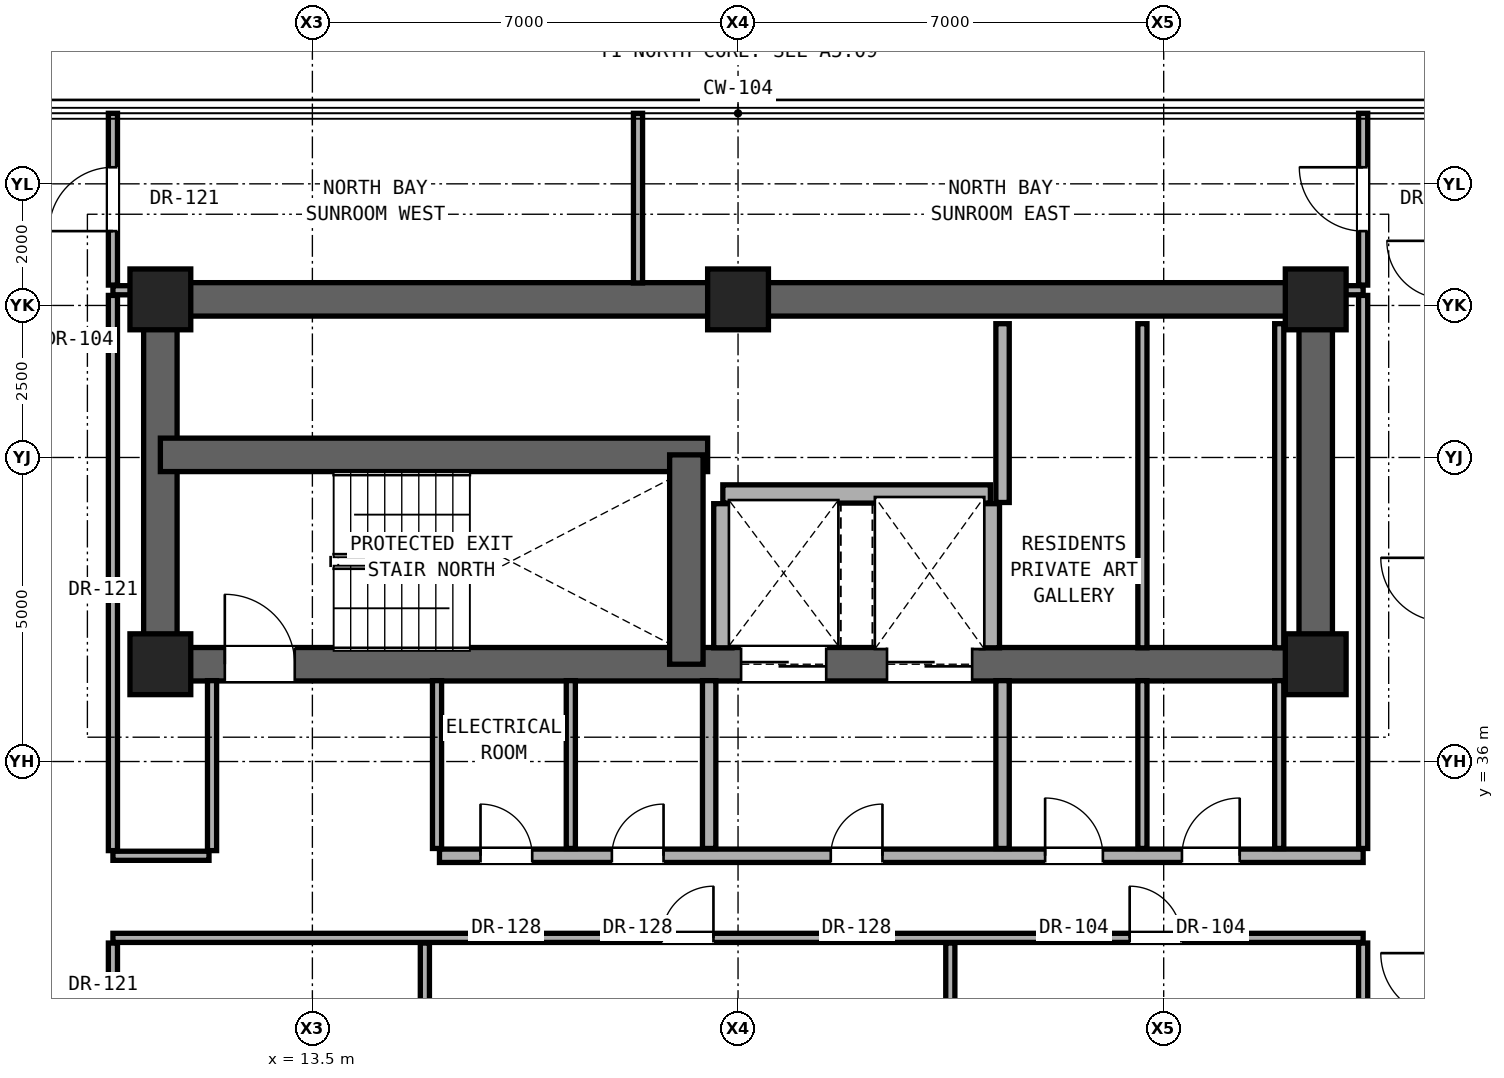
"""IFC4 building model, lengths in metres.
Left out: names, types, materials, properties, quantities, classifications, styles, units other than length and angle.
Written with IfcOpenShell. Run it as: python <this file> out.ifc"""

import sys

from ifc_helpers import new_model, si_unit, direction, frame, frame_2d, origin, origin_2d, place, context, subcontext, project, spatial, rectangle, extrude, element, fill, save


model = new_model("IFC4")
c1 = context("Model", 3, precision=1e-05, world=origin(), true_north=direction((0.0, 1.0)))
c2 = subcontext(c1, "Body", "Model", "MODEL_VIEW")
j1 = project(units=[si_unit("LENGTHUNIT", "METRE"), si_unit("PLANEANGLEUNIT", "RADIAN")], contexts=[c1])
p1 = place(None, origin())
s1 = spatial("IfcSite", under=j1, at=p1, CompositionType="ELEMENT")
p2 = place(p1, origin())
s2 = spatial("IfcBuilding", under=s1, at=p2, CompositionType="ELEMENT")
p3 = place(p2, frame((0.0, 0.0, 170.65)))
s3 = spatial("IfcBuildingStorey", under=s2, at=p3, CompositionType="ELEMENT", Elevation=170.65)
for number, where, z_axis, x_axis in (
    (1, (11.0, 37.6, 0.0), (0.0, 0.0, 1.0), (1.0, 0.0, 0.0)),
    (2, (30.0, 37.6, 0.0), (0.0, 0.0, 1.0), (1.0, 0.0, 0.0)),
    (3, (11.0, 43.6, 0.0), (0.0, 0.0, 1.0), (1.0, 0.0, 0.0)),
    (4, (20.5, 43.6, 0.0), (0.0, 0.0, 1.0), (1.0, 0.0, 0.0)),
    (5, (30.0, 43.6, 0.0), (0.0, 0.0, 1.0), (1.0, 0.0, 0.0)),
):
    element("IfcColumn", number, at=place(p3, frame(where, z_axis=z_axis, x_axis=x_axis)), inside=s3, PredefinedType="COLUMN", context=c2, shape_type="SweptSolid", body=[
        extrude(rectangle(XDim=1.0, YDim=1.0, at=origin_2d()), origin(), (0.0, 0.0, 1.0), 3.25),
    ])
p4 = place(p3, frame((11.0, 43.6, 0.0), z_axis=(0.0, 0.0, 1.0), x_axis=(1.0, 0.0, 0.0)))
e6 = element("IfcWall", 6, at=p4, inside=s3, PredefinedType="SHEAR", context=c2, shape_type="SweptSolid", body=[
    extrude(rectangle(XDim=19.0, YDim=0.55, at=frame_2d((9.5, 0.0))), origin(), (0.0, 0.0, 1.0), 3.05),
])
for number, where, z_axis, x_axis in (
    (7, (11.0, 37.6, 0.0), (0.0, 0.0, 1.0), (0.0, 1.0, 0.0)),
    (8, (30.0, 37.6, 0.0), (0.0, 0.0, 1.0), (0.0, 1.0, 0.0)),
):
    element("IfcWall", number, at=place(p3, frame(where, z_axis=z_axis, x_axis=x_axis)), inside=s3, PredefinedType="SHEAR", context=c2, shape_type="SweptSolid", body=[
        extrude(rectangle(XDim=6.0, YDim=0.55, at=frame_2d((3.0, 0.0))), origin(), (0.0, 0.0, 1.0), 3.05),
    ])
p5 = place(p3, frame((11.0, 37.6, 0.0), z_axis=(0.0, 0.0, 1.0), x_axis=(1.0, 0.0, 0.0)))
e9 = element("IfcWall", 9, at=p5, inside=s3, PredefinedType="SHEAR", context=c2, shape_type="SweptSolid", body=[
    extrude(rectangle(XDim=19.0, YDim=0.55, at=frame_2d((9.5, 0.0))), origin(), (0.0, 0.0, 1.0), 3.05),
])
p6 = place(p5, frame((1.06, 0.0, 0.0)))
e10 = element("IfcOpeningElement", 10, at=p6, cuts=e9, PredefinedType="OPENING", context=c2, shape_type="SweptSolid", body=[
    extrude(rectangle(XDim=1.15, YDim=2.2, at=frame_2d((0.575, 1.1))), frame((0.0, 0.285, 0.0), z_axis=(0.0, -1.0, 0.0), x_axis=(1.0, 0.0, 0.0)), (0.0, 0.0, 1.0), 0.57),
])
p7 = place(p5, frame((9.55, 0.0, 0.0)))
e11 = element("IfcOpeningElement", 11, at=p7, cuts=e9, PredefinedType="OPENING", context=c2, shape_type="SweptSolid", body=[
    extrude(rectangle(XDim=1.4, YDim=2.35, at=frame_2d((0.7, 1.175))), frame((0.0, 0.285, 0.0), z_axis=(0.0, -1.0, 0.0), x_axis=(1.0, 0.0, 0.0)), (0.0, 0.0, 1.0), 0.57),
])
p8 = place(p5, frame((11.95, 0.0, 0.0)))
e12 = element("IfcOpeningElement", 12, at=p8, cuts=e9, PredefinedType="OPENING", context=c2, shape_type="SweptSolid", body=[
    extrude(rectangle(XDim=1.4, YDim=2.35, at=frame_2d((0.7, 1.175))), frame((0.0, 0.285, 0.0), z_axis=(0.0, -1.0, 0.0), x_axis=(1.0, 0.0, 0.0)), (0.0, 0.0, 1.0), 0.57),
])
p9 = place(p3, frame((11.0, 41.043, 0.0), z_axis=(0.0, 0.0, 1.0), x_axis=(1.0, 0.0, 0.0)))
e13 = element("IfcWall", 13, at=p9, inside=s3, PredefinedType="SHEAR", context=c2, shape_type="SweptSolid", body=[
    extrude(rectangle(XDim=9.0, YDim=0.55, at=frame_2d((4.5, 0.0))), origin(), (0.0, 0.0, 1.0), 3.05),
])
p10 = place(p3, frame((19.65, 37.6, 0.0), z_axis=(0.0, 0.0, 1.0), x_axis=(0.0, 1.0, 0.0)))
e14 = element("IfcWall", 14, at=p10, inside=s3, PredefinedType="SHEAR", context=c2, shape_type="SweptSolid", body=[
    extrude(rectangle(XDim=3.443, YDim=0.55, at=frame_2d((1.721, 0.0))), origin(), (0.0, 0.0, 1.0), 3.05),
])
p11 = place(p3, frame((10.22, 33.1, 0.0), z_axis=(0.0, 0.0, 1.0), x_axis=(1.0, 0.0, 0.0)))
e15 = element("IfcWall", 15, at=p11, inside=s3, PredefinedType="PARTITIONING", context=c2, shape_type="SweptSolid", body=[
    extrude(rectangle(XDim=20.56, YDim=0.15, at=frame_2d((10.28, 0.0))), origin(), (0.0, 0.0, 1.0), 2.186),
])
p12 = place(p11, frame((9.025, 0.0, 0.0)))
e16 = element("IfcOpeningElement", 16, at=p12, cuts=e15, PredefinedType="OPENING", context=c2, shape_type="SweptSolid", body=[
    extrude(rectangle(XDim=0.85, YDim=2.01, at=frame_2d((0.425, 1.005))), frame((0.0, 0.085, 0.0), z_axis=(0.0, -1.0, 0.0), x_axis=(1.0, 0.0, 0.0)), (0.0, 0.0, 1.0), 0.17),
])
p13 = place(p11, frame((16.72, 0.0, 0.0)))
e17 = element("IfcOpeningElement", 17, at=p13, cuts=e15, PredefinedType="OPENING", context=c2, shape_type="SweptSolid", body=[
    extrude(rectangle(XDim=0.85, YDim=2.01, at=frame_2d((0.425, 1.005))), frame((0.0, 0.085, 0.0), z_axis=(0.0, -1.0, 0.0), x_axis=(1.0, 0.0, 0.0)), (0.0, 0.0, 1.0), 0.17),
])
p14 = place(p3, frame((10.22, 34.45, 0.0), z_axis=(0.0, 0.0, 1.0), x_axis=(1.0, 0.0, 0.0)))
e18 = element("IfcWall", 18, at=p14, inside=s3, PredefinedType="PARTITIONING", context=c2, shape_type="SweptSolid", body=[
    extrude(rectangle(XDim=1.58, YDim=0.15, at=frame_2d((0.79, 0.0))), origin(), (0.0, 0.0, 1.0), 2.186),
])
p15 = place(p3, frame((15.59, 34.45, 0.0), z_axis=(0.0, 0.0, 1.0), x_axis=(1.0, 0.0, 0.0)))
e19 = element("IfcWall", 19, at=p15, inside=s3, PredefinedType="SOLIDWALL", context=c2, shape_type="SweptSolid", body=[
    extrude(rectangle(XDim=15.19, YDim=0.22, at=frame_2d((7.595, 0.0))), origin(), (0.0, 0.0, 1.0), 2.186),
])
p16 = place(p15, frame((6.435, 0.0, 0.0)))
e20 = element("IfcOpeningElement", 20, at=p16, cuts=e19, PredefinedType="OPENING", context=c2, shape_type="SweptSolid", body=[
    extrude(rectangle(XDim=0.85, YDim=2.01, at=frame_2d((0.425, 1.005))), frame((0.0, 0.12, 0.0), z_axis=(0.0, -1.0, 0.0), x_axis=(1.0, 0.0, 0.0)), (0.0, 0.0, 1.0), 0.24),
])
p17 = place(p15, frame((9.96, 0.0, 0.0)))
e21 = element("IfcOpeningElement", 21, at=p17, cuts=e19, PredefinedType="OPENING", context=c2, shape_type="SweptSolid", body=[
    extrude(rectangle(XDim=0.95, YDim=2.15, at=frame_2d((0.475, 1.075))), frame((0.0, 0.12, 0.0), z_axis=(0.0, -1.0, 0.0), x_axis=(1.0, 0.0, 0.0)), (0.0, 0.0, 1.0), 0.24),
])
p18 = place(p15, frame((12.21, 0.0, 0.0)))
e22 = element("IfcOpeningElement", 22, at=p18, cuts=e19, PredefinedType="OPENING", context=c2, shape_type="SweptSolid", body=[
    extrude(rectangle(XDim=0.95, YDim=2.15, at=frame_2d((0.475, 1.075))), frame((0.0, 0.12, 0.0), z_axis=(0.0, -1.0, 0.0), x_axis=(1.0, 0.0, 0.0)), (0.0, 0.0, 1.0), 0.24),
])
p19 = place(p15, frame((0.675, 0.0, 0.0)))
e23 = element("IfcOpeningElement", 23, at=p19, cuts=e19, PredefinedType="OPENING", context=c2, shape_type="SweptSolid", body=[
    extrude(rectangle(XDim=0.85, YDim=2.01, at=frame_2d((0.425, 1.005))), frame((0.0, 0.12, 0.0), z_axis=(0.0, -1.0, 0.0), x_axis=(1.0, 0.0, 0.0)), (0.0, 0.0, 1.0), 0.24),
])
p20 = place(p15, frame((2.835, 0.0, 0.0)))
e24 = element("IfcOpeningElement", 24, at=p20, cuts=e19, PredefinedType="OPENING", context=c2, shape_type="SweptSolid", body=[
    extrude(rectangle(XDim=0.85, YDim=2.01, at=frame_2d((0.425, 1.005))), frame((0.0, 0.12, 0.0), z_axis=(0.0, -1.0, 0.0), x_axis=(1.0, 0.0, 0.0)), (0.0, 0.0, 1.0), 0.24),
])
p21 = place(p3, frame((20.25, 40.4, 0.0), z_axis=(0.0, 0.0, 1.0), x_axis=(1.0, 0.0, 0.0)))
e25 = element("IfcWall", 25, at=p21, inside=s3, PredefinedType="SOLIDWALL", context=c2, shape_type="SweptSolid", body=[
    extrude(rectangle(XDim=4.4, YDim=0.3, at=frame_2d((2.2, 0.0))), origin(), (0.0, 0.0, 1.0), 3.05),
])
for number, where, z_axis, x_axis in (
    (26, (10.22, 43.75, 0.0), (0.0, 0.0, 1.0), (1.0, 0.0, 0.0)),
    (27, (30.27, 43.75, 0.0), (0.0, 0.0, 1.0), (1.0, 0.0, 0.0)),
):
    element("IfcWall", number, at=place(p3, frame(where, z_axis=z_axis, x_axis=x_axis)), inside=s3, PredefinedType="PARTITIONING", context=c2, shape_type="SweptSolid", body=[
        extrude(rectangle(XDim=0.51, YDim=0.15, at=frame_2d((0.255, 0.0))), origin(), (0.0, 0.0, 1.0), 3.05),
    ])
p22 = place(p3, frame((10.22, 22.935, 0.0), z_axis=(0.0, 0.0, 1.0), x_axis=(0.0, 1.0, 0.0)))
e28 = element("IfcWall", 28, at=p22, inside=s3, PredefinedType="PARTITIONING", context=c2, shape_type="SweptSolid", body=[
    extrude(rectangle(XDim=10.08, YDim=0.15, at=frame_2d((5.04, 0.0))), origin(), (0.0, 0.0, 1.0), 2.346),
])
p23 = place(p22, frame((4.565, 0.0, 0.0)))
e29 = element("IfcOpeningElement", 29, at=p23, cuts=e28, PredefinedType="OPENING", context=c2, shape_type="SweptSolid", body=[
    extrude(rectangle(XDim=0.95, YDim=2.15, at=frame_2d((0.475, 1.075))), frame((0.0, 0.085, 0.0), z_axis=(0.0, -1.0, 0.0), x_axis=(1.0, 0.0, 0.0)), (0.0, 0.0, 1.0), 0.17),
])
p24 = place(p3, frame((10.22, 34.535, 0.0), z_axis=(0.0, 0.0, 1.0), x_axis=(0.0, 1.0, 0.0)))
e30 = element("IfcWall", 30, at=p24, inside=s3, PredefinedType="PARTITIONING", context=c2, shape_type="SweptSolid", body=[
    extrude(rectangle(XDim=9.13, YDim=0.15, at=frame_2d((4.565, 0.0))), origin(), (0.0, 0.0, 1.0), 2.442),
])
p25 = place(p3, frame((10.22, 43.835, 0.0), z_axis=(0.0, 0.0, 1.0), x_axis=(0.0, 1.0, 0.0)))
e31 = element("IfcWall", 31, at=p25, inside=s3, PredefinedType="PARTITIONING", context=c2, shape_type="SweptSolid", body=[
    extrude(rectangle(XDim=2.825, YDim=0.15, at=frame_2d((1.413, 0.0))), origin(), (0.0, 0.0, 1.0), 3.05),
])
p26 = place(p25, frame((0.887, 0.0, 0.0)))
e32 = element("IfcOpeningElement", 32, at=p26, cuts=e31, PredefinedType="OPENING", context=c2, shape_type="SweptSolid", body=[
    extrude(rectangle(XDim=1.05, YDim=2.2, at=frame_2d((0.525, 1.1))), frame((0.0, 0.085, 0.0), z_axis=(0.0, -1.0, 0.0), x_axis=(1.0, 0.0, 0.0)), (0.0, 0.0, 1.0), 0.17),
])
p27 = place(p3, frame((11.85, 34.535, 0.0), z_axis=(0.0, 0.0, 1.0), x_axis=(0.0, 1.0, 0.0)))
e33 = element("IfcWall", 33, at=p27, inside=s3, PredefinedType="PARTITIONING", context=c2, shape_type="SweptSolid", body=[
    extrude(rectangle(XDim=2.795, YDim=0.15, at=frame_2d((1.397, 0.0))), origin(), (0.0, 0.0, 1.0), 3.05),
])
p28 = place(p3, frame((15.35, 25.925, 0.0), z_axis=(0.0, 0.0, 1.0), x_axis=(0.0, 1.0, 0.0)))
e34 = element("IfcWall", 34, at=p28, inside=s3, PredefinedType="PARTITIONING", context=c2, shape_type="SweptSolid", body=[
    extrude(rectangle(XDim=7.09, YDim=0.15, at=frame_2d((3.545, 0.0))), origin(), (0.0, 0.0, 1.0), 2.186),
])
for number, where, z_axis, x_axis in (
    (35, (15.55, 34.57, 0.0), (0.0, 0.0, 1.0), (0.0, 1.0, 0.0)),
    (36, (17.75, 34.57, 0.0), (0.0, 0.0, 1.0), (0.0, 1.0, 0.0)),
):
    element("IfcWall", number, at=place(p3, frame(where, z_axis=z_axis, x_axis=x_axis)), inside=s3, PredefinedType="PARTITIONING", context=c2, shape_type="SweptSolid", body=[
        extrude(rectangle(XDim=2.76, YDim=0.15, at=frame_2d((1.38, 0.0))), origin(), (0.0, 0.0, 1.0), 3.05),
    ])
p29 = place(p3, frame((18.855, 43.87, 0.0), z_axis=(0.0, 0.0, 1.0), x_axis=(0.0, 1.0, 0.0)))
e37 = element("IfcWall", 37, at=p29, inside=s3, PredefinedType="PARTITIONING", context=c2, shape_type="SweptSolid", body=[
    extrude(rectangle(XDim=2.79, YDim=0.15, at=frame_2d((1.395, 0.0))), origin(), (0.0, 0.0, 1.0), 3.05),
])
p30 = place(p3, frame((20.025, 34.57, 0.0), z_axis=(0.0, 0.0, 1.0), x_axis=(0.0, 1.0, 0.0)))
e38 = element("IfcWall", 38, at=p30, inside=s3, PredefinedType="SOLIDWALL", context=c2, shape_type="SweptSolid", body=[
    extrude(rectangle(XDim=2.76, YDim=0.22, at=frame_2d((1.38, 0.0))), origin(), (0.0, 0.0, 1.0), 3.05),
])
p31 = place(p3, frame((20.25, 37.87, 0.0), z_axis=(0.0, 0.0, 1.0), x_axis=(0.0, 1.0, 0.0)))
e39 = element("IfcWall", 39, at=p31, inside=s3, PredefinedType="SOLIDWALL", context=c2, shape_type="SweptSolid", body=[
    extrude(rectangle(XDim=2.37, YDim=0.3, at=frame_2d((1.185, 0.0))), origin(), (0.0, 0.0, 1.0), 3.05),
])
p32 = place(p3, frame((23.991, 25.925, 0.0), z_axis=(0.0, 0.0, 1.0), x_axis=(0.0, 1.0, 0.0)))
e40 = element("IfcWall", 40, at=p32, inside=s3, PredefinedType="PARTITIONING", context=c2, shape_type="SweptSolid", body=[
    extrude(rectangle(XDim=7.09, YDim=0.15, at=frame_2d((3.545, 0.0))), origin(), (0.0, 0.0, 1.0), 2.186),
])
p33 = place(p3, frame((24.65, 37.87, 0.0), z_axis=(0.0, 0.0, 1.0), x_axis=(0.0, 1.0, 0.0)))
e41 = element("IfcWall", 41, at=p33, inside=s3, PredefinedType="SOLIDWALL", context=c2, shape_type="SweptSolid", body=[
    extrude(rectangle(XDim=2.37, YDim=0.3, at=frame_2d((1.185, 0.0))), origin(), (0.0, 0.0, 1.0), 3.05),
])
p34 = place(p3, frame((24.85, 34.57, 0.0), z_axis=(0.0, 0.0, 1.0), x_axis=(0.0, 1.0, 0.0)))
e42 = element("IfcWall", 42, at=p34, inside=s3, PredefinedType="SOLIDWALL", context=c2, shape_type="SweptSolid", body=[
    extrude(rectangle(XDim=2.76, YDim=0.22, at=frame_2d((1.38, 0.0))), origin(), (0.0, 0.0, 1.0), 3.05),
])
p35 = place(p3, frame((24.85, 40.26, 0.0), z_axis=(0.0, 0.0, 1.0), x_axis=(0.0, 1.0, 0.0)))
e43 = element("IfcWall", 43, at=p35, inside=s3, PredefinedType="SOLIDWALL", context=c2, shape_type="SweptSolid", body=[
    extrude(rectangle(XDim=2.94, YDim=0.22, at=frame_2d((1.47, 0.0))), origin(), (0.0, 0.0, 1.0), 3.05),
])
p36 = place(p3, frame((27.15, 34.57, 0.0), z_axis=(0.0, 0.0, 1.0), x_axis=(0.0, 1.0, 0.0)))
e44 = element("IfcWall", 44, at=p36, inside=s3, PredefinedType="PARTITIONING", context=c2, shape_type="SweptSolid", body=[
    extrude(rectangle(XDim=2.76, YDim=0.15, at=frame_2d((1.38, 0.0))), origin(), (0.0, 0.0, 1.0), 3.05),
])
p37 = place(p3, frame((27.15, 37.87, 0.0), z_axis=(0.0, 0.0, 1.0), x_axis=(0.0, 1.0, 0.0)))
e45 = element("IfcWall", 45, at=p37, inside=s3, PredefinedType="PARTITIONING", context=c2, shape_type="SweptSolid", body=[
    extrude(rectangle(XDim=5.33, YDim=0.15, at=frame_2d((2.665, 0.0))), origin(), (0.0, 0.0, 1.0), 3.05),
])
p38 = place(p3, frame((29.4, 34.57, 0.0), z_axis=(0.0, 0.0, 1.0), x_axis=(0.0, 1.0, 0.0)))
e46 = element("IfcWall", 46, at=p38, inside=s3, PredefinedType="PARTITIONING", context=c2, shape_type="SweptSolid", body=[
    extrude(rectangle(XDim=2.76, YDim=0.15, at=frame_2d((1.38, 0.0))), origin(), (0.0, 0.0, 1.0), 3.05),
])
p39 = place(p3, frame((29.4, 37.87, 0.0), z_axis=(0.0, 0.0, 1.0), x_axis=(0.0, 1.0, 0.0)))
e47 = element("IfcWall", 47, at=p39, inside=s3, PredefinedType="PARTITIONING", context=c2, shape_type="SweptSolid", body=[
    extrude(rectangle(XDim=5.33, YDim=0.15, at=frame_2d((2.665, 0.0))), origin(), (0.0, 0.0, 1.0), 3.05),
])
p40 = place(p3, frame((30.78, 25.925, 0.0), z_axis=(0.0, 0.0, 1.0), x_axis=(0.0, 1.0, 0.0)))
e48 = element("IfcWall", 48, at=p40, inside=s3, PredefinedType="PARTITIONING", context=c2, shape_type="SweptSolid", body=[
    extrude(rectangle(XDim=7.09, YDim=0.15, at=frame_2d((3.545, 0.0))), origin(), (0.0, 0.0, 1.0), 2.346),
])
p41 = place(p3, frame((30.78, 34.57, 0.0), z_axis=(0.0, 0.0, 1.0), x_axis=(0.0, 1.0, 0.0)))
e49 = element("IfcWall", 49, at=p41, inside=s3, PredefinedType="PARTITIONING", context=c2, shape_type="SweptSolid", body=[
    extrude(rectangle(XDim=9.095, YDim=0.15, at=frame_2d((4.547, 0.0))), origin(), (0.0, 0.0, 1.0), 2.442),
])
p42 = place(p3, frame((30.78, 43.835, 0.0), z_axis=(0.0, 0.0, 1.0), x_axis=(0.0, 1.0, 0.0)))
e50 = element("IfcWall", 50, at=p42, inside=s3, PredefinedType="PARTITIONING", context=c2, shape_type="SweptSolid", body=[
    extrude(rectangle(XDim=2.825, YDim=0.15, at=frame_2d((1.413, 0.0))), origin(), (0.0, 0.0, 1.0), 3.05),
])
p43 = place(p42, frame((0.887, 0.0, 0.0)))
e51 = element("IfcOpeningElement", 51, at=p43, cuts=e50, PredefinedType="OPENING", context=c2, shape_type="SweptSolid", body=[
    extrude(rectangle(XDim=1.05, YDim=2.2, at=frame_2d((0.525, 1.1))), frame((0.0, 0.085, 0.0), z_axis=(0.0, -1.0, 0.0), x_axis=(1.0, 0.0, 0.0)), (0.0, 0.0, 1.0), 0.17),
])
p44 = place(p6, origin())
e52 = element("IfcDoor", 52, at=p44, inside=s3, OperationType="SINGLE_SWING_LEFT", PredefinedType="DOOR", context=c2, shape_type="SweptSolid", body=[
    extrude(rectangle(XDim=1.15, YDim=2.2, at=frame_2d((0.575, 1.1))), frame((0.0, 0.025, 0.0), z_axis=(0.0, -1.0, 0.0), x_axis=(1.0, 0.0, 0.0)), (0.0, 0.0, 1.0), 0.05),
])
fill(e10, e52)
p45 = place(p16, origin())
e53 = element("IfcDoor", 53, at=p45, inside=s3, OperationType="SINGLE_SWING_RIGHT", PredefinedType="DOOR", context=c2, shape_type="SweptSolid", body=[
    extrude(rectangle(XDim=0.85, YDim=2.01, at=frame_2d((0.425, 1.005))), frame((0.0, 0.025, 0.0), z_axis=(0.0, -1.0, 0.0), x_axis=(1.0, 0.0, 0.0)), (0.0, 0.0, 1.0), 0.05),
])
fill(e20, e53)
p46 = place(p17, origin())
e54 = element("IfcDoor", 54, at=p46, inside=s3, OperationType="SINGLE_SWING_LEFT", PredefinedType="DOOR", context=c2, shape_type="SweptSolid", body=[
    extrude(rectangle(XDim=0.95, YDim=2.15, at=frame_2d((0.475, 1.075))), frame((0.0, 0.025, 0.0), z_axis=(0.0, -1.0, 0.0), x_axis=(1.0, 0.0, 0.0)), (0.0, 0.0, 1.0), 0.05),
])
fill(e21, e54)
p47 = place(p18, origin())
e55 = element("IfcDoor", 55, at=p47, inside=s3, OperationType="SINGLE_SWING_RIGHT", PredefinedType="DOOR", context=c2, shape_type="SweptSolid", body=[
    extrude(rectangle(XDim=0.95, YDim=2.15, at=frame_2d((0.475, 1.075))), frame((0.0, 0.025, 0.0), z_axis=(0.0, -1.0, 0.0), x_axis=(1.0, 0.0, 0.0)), (0.0, 0.0, 1.0), 0.05),
])
fill(e22, e55)
p48 = place(p19, origin())
e56 = element("IfcDoor", 56, at=p48, inside=s3, OperationType="SINGLE_SWING_LEFT", PredefinedType="DOOR", context=c2, shape_type="SweptSolid", body=[
    extrude(rectangle(XDim=0.85, YDim=2.01, at=frame_2d((0.425, 1.005))), frame((0.0, 0.025, 0.0), z_axis=(0.0, -1.0, 0.0), x_axis=(1.0, 0.0, 0.0)), (0.0, 0.0, 1.0), 0.05),
])
fill(e23, e56)
p49 = place(p20, origin())
e57 = element("IfcDoor", 57, at=p49, inside=s3, OperationType="SINGLE_SWING_RIGHT", PredefinedType="DOOR", context=c2, shape_type="SweptSolid", body=[
    extrude(rectangle(XDim=0.85, YDim=2.01, at=frame_2d((0.425, 1.005))), frame((0.0, 0.025, 0.0), z_axis=(0.0, -1.0, 0.0), x_axis=(1.0, 0.0, 0.0)), (0.0, 0.0, 1.0), 0.05),
])
fill(e24, e57)
p50 = place(p12, origin())
e58 = element("IfcDoor", 58, at=p50, inside=s3, OperationType="SINGLE_SWING_RIGHT", PredefinedType="DOOR", context=c2, shape_type="SweptSolid", body=[
    extrude(rectangle(XDim=0.85, YDim=2.01, at=frame_2d((0.425, 1.005))), frame((0.0, 0.025, 0.0), z_axis=(0.0, -1.0, 0.0), x_axis=(1.0, 0.0, 0.0)), (0.0, 0.0, 1.0), 0.05),
])
fill(e16, e58)
p51 = place(p13, origin())
e59 = element("IfcDoor", 59, at=p51, inside=s3, OperationType="SINGLE_SWING_LEFT", PredefinedType="DOOR", context=c2, shape_type="SweptSolid", body=[
    extrude(rectangle(XDim=0.85, YDim=2.01, at=frame_2d((0.425, 1.005))), frame((0.0, 0.025, 0.0), z_axis=(0.0, -1.0, 0.0), x_axis=(1.0, 0.0, 0.0)), (0.0, 0.0, 1.0), 0.05),
])
fill(e17, e59)
p52 = place(p26, origin())
e60 = element("IfcDoor", 60, at=p52, inside=s3, OperationType="SINGLE_SWING_LEFT", PredefinedType="DOOR", context=c2, shape_type="SweptSolid", body=[
    extrude(rectangle(XDim=1.05, YDim=2.2, at=frame_2d((0.525, 1.1))), frame((0.0, 0.025, 0.0), z_axis=(0.0, -1.0, 0.0), x_axis=(1.0, 0.0, 0.0)), (0.0, 0.0, 1.0), 0.05),
])
fill(e32, e60)
p53 = place(p43, origin())
e61 = element("IfcDoor", 61, at=p53, inside=s3, OperationType="SINGLE_SWING_RIGHT", PredefinedType="DOOR", context=c2, shape_type="SweptSolid", body=[
    extrude(rectangle(XDim=1.05, YDim=2.2, at=frame_2d((0.525, 1.1))), frame((0.0, 0.025, 0.0), z_axis=(0.0, -1.0, 0.0), x_axis=(1.0, 0.0, 0.0)), (0.0, 0.0, 1.0), 0.05),
])
fill(e51, e61)
p54 = place(p7, origin())
e62 = element("IfcDoor", 62, at=p54, inside=s3, OperationType="DOUBLE_DOOR_SLIDING", PredefinedType="DOOR", context=c2, shape_type="SweptSolid", body=[
    extrude(rectangle(XDim=1.4, YDim=2.35, at=frame_2d((0.7, 1.175))), frame((0.0, 0.025, 0.0), z_axis=(0.0, -1.0, 0.0), x_axis=(1.0, 0.0, 0.0)), (0.0, 0.0, 1.0), 0.05),
])
fill(e11, e62)
p55 = place(p8, origin())
e63 = element("IfcDoor", 63, at=p55, inside=s3, OperationType="DOUBLE_DOOR_SLIDING", PredefinedType="DOOR", context=c2, shape_type="SweptSolid", body=[
    extrude(rectangle(XDim=1.4, YDim=2.35, at=frame_2d((0.7, 1.175))), frame((0.0, 0.025, 0.0), z_axis=(0.0, -1.0, 0.0), x_axis=(1.0, 0.0, 0.0)), (0.0, 0.0, 1.0), 0.05),
])
fill(e12, e63)
save(model, sys.argv[1])
